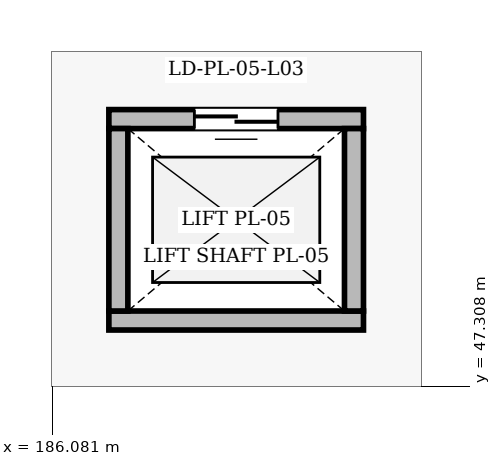
"""IFC4 building model, lengths in metres.
Left out: names, types, materials, properties, quantities, classifications, styles, units other than length and angle.
Written with IfcOpenShell. Run it as: python <this file> out.ifc"""

import sys

from ifc_helpers import new_model, si_unit, direction, frame, frame_2d, origin, place, context, subcontext, project, spatial, rectangle, extrude, element, fill, save


model = new_model("IFC4")
c1 = context("Model", 3, precision=1e-05, world=origin(), true_north=direction((0.0, 1.0)))
c2 = subcontext(c1, "Body", "Model", "MODEL_VIEW")
j1 = project(units=[si_unit("LENGTHUNIT", "METRE"), si_unit("PLANEANGLEUNIT", "RADIAN")], contexts=[c1])
p1 = place(None, origin())
s1 = spatial("IfcSite", under=j1, at=p1, CompositionType="ELEMENT")
p2 = place(p1, origin())
s2 = spatial("IfcBuilding", under=s1, at=p2, CompositionType="ELEMENT")
p3 = place(p2, frame((0.0, 0.0, 15.6)))
s3 = spatial("IfcBuildingStorey", under=s2, at=p3, CompositionType="ELEMENT", Elevation=15.6)
p4 = place(p3, frame((186.825, 48.175, 0.0), z_axis=(0.0, 0.0, 1.0), x_axis=(1.0, 0.0, 0.0)))
e1 = element("IfcWall", 1, at=p4, inside=s3, PredefinedType="SOLIDWALL", context=c2, shape_type="SweptSolid", body=[
    extrude(rectangle(XDim=3.35, YDim=0.25, at=frame_2d((1.675, 0.0))), origin(), (0.0, 0.0, 1.0), 4.128),
])
p5 = place(p3, frame((190.175, 50.825, 0.0), z_axis=(0.0, 0.0, 1.0), x_axis=(-1.0, 0.0, 0.0)))
e2 = element("IfcWall", 2, at=p5, inside=s3, PredefinedType="SOLIDWALL", context=c2, shape_type="SweptSolid", body=[
    extrude(rectangle(XDim=3.35, YDim=0.25, at=frame_2d((1.675, 0.0))), origin(), (0.0, 0.0, 1.0), 4.128),
])
p6 = place(p5, frame((1.125, 0.0, 0.0)))
e3 = element("IfcOpeningElement", 3, at=p6, cuts=e2, PredefinedType="OPENING", context=c2, shape_type="SweptSolid", body=[
    extrude(rectangle(XDim=1.1, YDim=2.2, at=frame_2d((0.55, 1.1))), frame((0.0, 0.135, 0.0), z_axis=(0.0, -1.0, 0.0), x_axis=(1.0, 0.0, 0.0)), (0.0, 0.0, 1.0), 0.27),
])
for number, where, z_axis, x_axis in (
    (4, (186.95, 50.7, 0.0), (0.0, 0.0, 1.0), (0.0, -1.0, 0.0)),
    (5, (190.05, 48.3, 0.0), (0.0, 0.0, 1.0), (0.0, 1.0, 0.0)),
):
    element("IfcWall", number, at=place(p3, frame(where, z_axis=z_axis, x_axis=x_axis)), inside=s3, PredefinedType="SOLIDWALL", context=c2, shape_type="SweptSolid", body=[
        extrude(rectangle(XDim=2.4, YDim=0.25, at=frame_2d((1.2, 0.0))), origin(), (0.0, 0.0, 1.0), 4.6),
    ])
p7 = place(p6, origin())
e6 = element("IfcDoor", 6, at=p7, inside=s3, OperationType="DOUBLE_DOOR_SLIDING", PredefinedType="DOOR", context=c2, shape_type="SweptSolid", body=[
    extrude(rectangle(XDim=1.1, YDim=2.2, at=frame_2d((0.55, 1.1))), frame((0.0, 0.025, 0.0), z_axis=(0.0, -1.0, 0.0), x_axis=(1.0, 0.0, 0.0)), (0.0, 0.0, 1.0), 0.05),
])
fill(e3, e6)
save(model, sys.argv[1])
